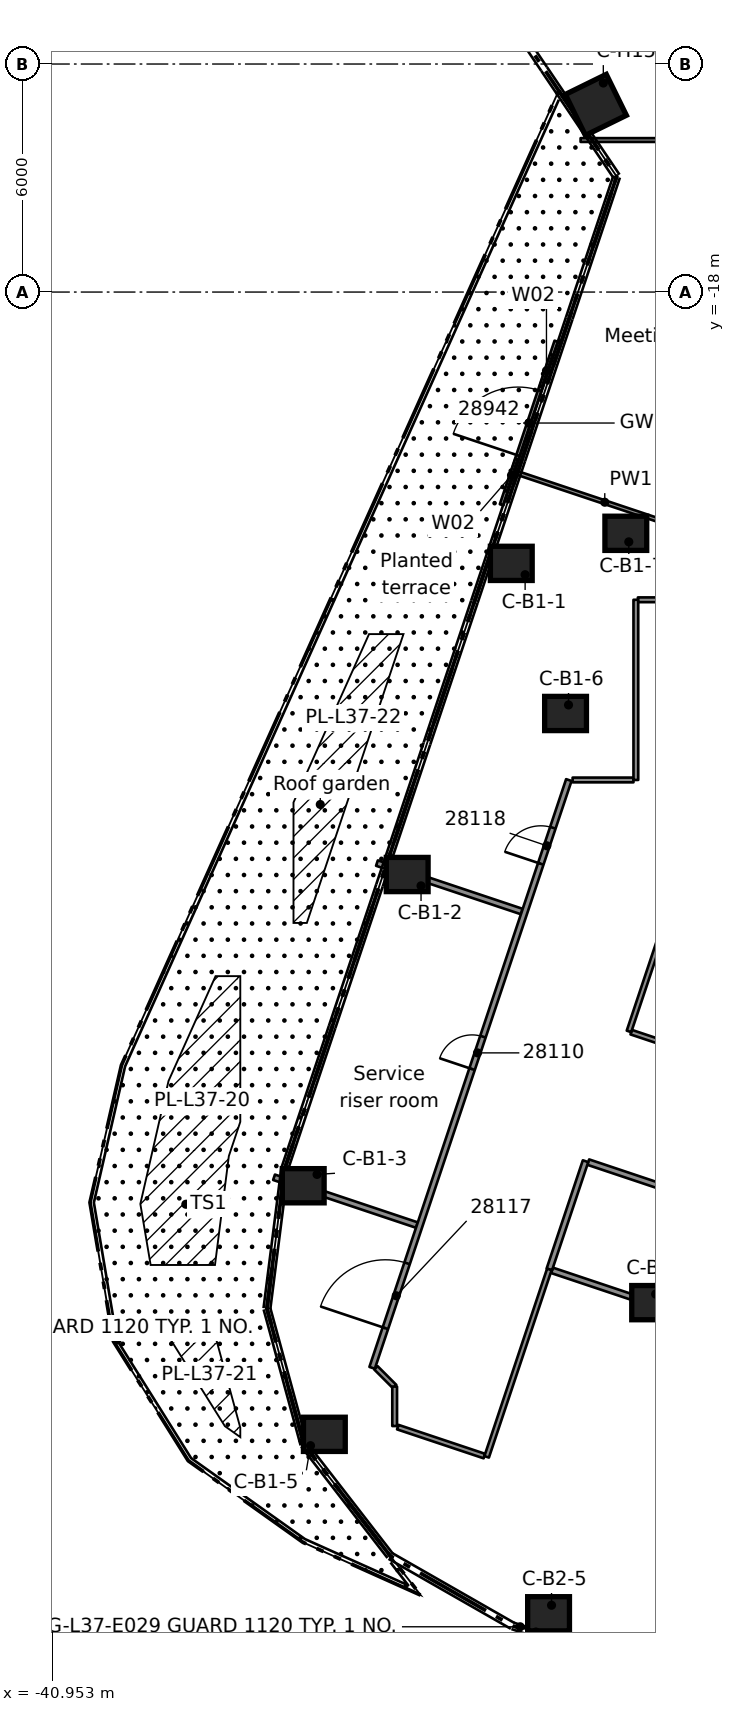
"""IFC4 building model, lengths in metres.
Left out: names, types, materials, properties, quantities, classifications, styles, units other than length and angle.
Written with IfcOpenShell. Run it as: python <this file> out.ifc"""

import sys

from ifc_helpers import new_model, si_unit, direction, frame, frame_2d, origin, origin_2d, place, context, subcontext, project, spatial, rectangle, extrude, element, fill, save


model = new_model("IFC4")
c1 = context("Model", 3, precision=1e-05, world=origin(), true_north=direction((0.0, 1.0)))
c2 = subcontext(c1, "Body", "Model", "MODEL_VIEW")
j1 = project(units=[si_unit("LENGTHUNIT", "METRE"), si_unit("PLANEANGLEUNIT", "RADIAN")], contexts=[c1])
p1 = place(None, origin())
s1 = spatial("IfcSite", under=j1, at=p1, CompositionType="ELEMENT")
p2 = place(p1, origin())
s2 = spatial("IfcBuilding", under=s1, at=p2, CompositionType="ELEMENT")
p3 = place(p2, frame((0.0, 0.0, 145.6)))
s3 = spatial("IfcBuildingStorey", under=s2, at=p3, CompositionType="ELEMENT", Elevation=145.6)
for number, where, z_axis, x_axis in (
    (1, (-28.869, -25.139, 0.0), (0.0, 0.0, 1.0), (1.0, 0.0, 0.0)),
    (2, (-31.608, -33.326, 0.0), (0.0, 0.0, 1.0), (1.0, 0.0, 0.0)),
    (3, (-34.344, -41.515, 0.0), (0.0, 0.0, 1.0), (1.0, 0.0, 0.0)),
    (4, (-33.788, -48.056, 0.0), (0.0, 0.0, 1.0), (1.0, 0.0, 0.0)),
    (5, (-27.441, -29.089, 0.0), (0.0, 0.0, 1.0), (1.0, 0.0, 0.0)),
    (6, (-25.855, -24.348, 0.0), (0.0, 0.0, 1.0), (1.0, 0.0, 0.0)),
    (7, (-25.149, -44.591, 0.0), (0.0, 0.0, 1.0), (1.0, 0.0, 0.0)),
    (8, (-27.888, -52.778, 0.0), (0.0, 0.0, 1.0), (1.0, 0.0, 0.0)),
):
    element("IfcColumn", number, at=place(p3, frame(where, z_axis=z_axis, x_axis=x_axis)), inside=s3, PredefinedType="COLUMN", context=c2, shape_type="SweptSolid", body=[
        extrude(rectangle(XDim=1.1, YDim=0.9, at=origin_2d()), origin(), (0.0, 0.0, 1.0), 3.5),
    ])
p4 = place(p3, frame((-26.644, -13.075, 0.0), z_axis=(0.0, 0.0, 1.0), x_axis=(-0.897727910651, -0.440550335873, 0.0)))
e9 = element("IfcColumn", 9, at=p4, inside=s3, PredefinedType="COLUMN", context=c2, shape_type="SweptSolid", body=[
    extrude(rectangle(XDim=1.2, YDim=1.2, at=origin_2d()), origin(), (0.0, 0.0, 1.0), 3.5),
])
p5 = place(p3, frame((-29.123, -23.598, 0.0), z_axis=(0.0, 0.0, 1.0), x_axis=(0.317308744881, 0.948322287211, 0.0)))
e10 = element("IfcWall", 10, at=p5, inside=s3, PredefinedType="STANDARD", context=c2, shape_type="SweptSolid", body=[
    extrude(rectangle(XDim=4.539, YDim=0.1, at=frame_2d((2.27, 0.0))), origin(), (0.0, 0.0, 1.0), 3.1),
])
p6 = place(p5, frame((1.369, 0.0, 0.0)))
e11 = element("IfcOpeningElement", 11, at=p6, cuts=e10, PredefinedType="OPENING", context=c2, shape_type="SweptSolid", body=[
    extrude(rectangle(XDim=1.8, YDim=2.4, at=frame_2d((0.9, 1.2))), frame((0.0, 0.06, 0.0), z_axis=(0.0, -1.0, 0.0), x_axis=(1.0, 0.0, 0.0)), (0.0, 0.0, 1.0), 0.12),
])
p7 = place(p5, frame((0.369, 0.0, 0.0)))
e12 = element("IfcOpeningElement", 12, at=p7, cuts=e10, PredefinedType="OPENING", context=c2, shape_type="SweptSolid", body=[
    extrude(rectangle(XDim=0.9, YDim=2.4, at=frame_2d((0.45, 1.2))), frame((0.0, 0.06, 0.0), z_axis=(0.0, -1.0, 0.0), x_axis=(1.0, 0.0, 0.0)), (0.0, 0.0, 1.0), 0.12),
])
p8 = place(p5, frame((3.269, 0.0, 0.0)))
e13 = element("IfcOpeningElement", 13, at=p8, cuts=e10, PredefinedType="OPENING", context=c2, shape_type="SweptSolid", body=[
    extrude(rectangle(XDim=0.9, YDim=2.4, at=frame_2d((0.45, 1.2))), frame((0.0, 0.06, 0.0), z_axis=(0.0, -1.0, 0.0), x_axis=(1.0, 0.0, 0.0)), (0.0, 0.0, 1.0), 0.12),
])
p9 = place(p3, frame((-31.856, -47.866, 0.0), z_axis=(0.0, 0.0, 1.0), x_axis=(0.948398445466, -0.317081044274, 0.0)))
e14 = element("IfcWall", 14, at=p9, inside=s3, PredefinedType="PARTITIONING", context=c2, shape_type="SweptSolid", body=[
    extrude(rectangle(XDim=2.403, YDim=0.125, at=frame_2d((1.202, 0.0))), origin(), (0.0, 0.0, 1.0), 3.08),
])
p10 = place(p3, frame((-35.112, -41.292, 0.0), z_axis=(0.0, 0.0, 1.0), x_axis=(0.948300748581, -0.317373108881, 0.0)))
e15 = element("IfcWall", 15, at=p10, inside=s3, PredefinedType="PARTITIONING", context=c2, shape_type="SweptSolid", body=[
    extrude(rectangle(XDim=3.964, YDim=0.15, at=frame_2d((1.982, 0.0))), origin(), (0.0, 0.0, 1.0), 3.08),
])
p11 = place(p3, frame((-27.797, -43.741, 0.0), z_axis=(0.0, 0.0, 1.0), x_axis=(0.948342550157, -0.31724817976, 0.0)))
e16 = element("IfcWall", 16, at=p11, inside=s3, PredefinedType="PARTITIONING", context=c2, shape_type="SweptSolid", body=[
    extrude(rectangle(XDim=24.041, YDim=0.15, at=frame_2d((12.021, 0.0))), origin(), (0.0, 0.0, 1.0), 3.08),
])
p12 = place(p3, frame((-4.12, -48.496, 0.0), z_axis=(0.0, 0.0, 1.0), x_axis=(-0.948327115108, 0.31729431566, 0.0)))
e17 = element("IfcWall", 17, at=p12, inside=s3, PredefinedType="PARTITIONING", context=c2, shape_type="SweptSolid", body=[
    extrude(rectangle(XDim=23.962, YDim=0.15, at=frame_2d((11.981, 0.0))), origin(), (0.0, 0.0, 1.0), 3.08),
])
p13 = place(p12, frame((11.525, 0.0, 0.0)))
e18 = element("IfcOpeningElement", 18, at=p13, cuts=e17, PredefinedType="OPENING", context=c2, shape_type="SweptSolid", body=[
    extrude(rectangle(XDim=0.9, YDim=2.1, at=frame_2d((0.45, 1.05))), frame((0.0, 0.085, 0.0), z_axis=(0.0, -1.0, 0.0), x_axis=(1.0, 0.0, 0.0)), (0.0, 0.0, 1.0), 0.17),
])
p14 = place(p3, frame((-25.713, -37.474, 0.0), z_axis=(0.0, 0.0, 1.0), x_axis=(0.948252483091, -0.317517288209, 0.0)))
e19 = element("IfcWall", 19, at=p14, inside=s3, PredefinedType="PARTITIONING", context=c2, shape_type="SweptSolid", body=[
    extrude(rectangle(XDim=1.533, YDim=0.125, at=frame_2d((0.767, 0.0))), origin(), (0.0, 0.0, 1.0), 3.08),
])
p15 = place(p3, frame((-32.404, -33.025, 0.0), z_axis=(0.0, 0.0, 1.0), x_axis=(0.948324257316, -0.317302856884, 0.0)))
e20 = element("IfcWall", 20, at=p15, inside=s3, PredefinedType="PARTITIONING", context=c2, shape_type="SweptSolid", body=[
    extrude(rectangle(XDim=4.019, YDim=0.15, at=frame_2d((2.009, 0.0))), origin(), (0.0, 0.0, 1.0), 3.08),
])
p16 = place(p3, frame((-28.735, -22.752, 0.0), z_axis=(0.0, 0.0, 1.0), x_axis=(0.948349317967, -0.317227948188, 0.0)))
e21 = element("IfcWall", 21, at=p16, inside=s3, PredefinedType="PARTITIONING", context=c2, shape_type="SweptSolid", body=[
    extrude(rectangle(XDim=4.906, YDim=0.1, at=frame_2d((2.453, 0.0))), origin(), (0.0, 0.0, 1.0), 3.08),
])
p17 = place(p3, frame((-32.431, -46.306, 0.0), z_axis=(0.0, 0.0, 1.0), x_axis=(0.706931689754, -0.707281829274, 0.0)))
e22 = element("IfcWall", 22, at=p17, inside=s3, PredefinedType="PARTITIONING", context=c2, shape_type="SweptSolid", body=[
    extrude(rectangle(XDim=0.697, YDim=0.125, at=frame_2d((0.349, 0.0))), origin(), (0.0, 0.0, 1.0), 3.08),
])
p18 = place(p3, frame((-27.255, -30.838, 0.0), z_axis=(0.0, 0.0, 1.0), x_axis=(1.0, 0.0, 0.0)))
e23 = element("IfcWall", 23, at=p18, inside=s3, PredefinedType="PARTITIONING", context=c2, shape_type="SweptSolid", body=[
    extrude(rectangle(XDim=1.601, YDim=0.125, at=frame_2d((0.8, 0.0))), origin(), (0.0, 0.0, 1.0), 3.08),
])
p19 = place(p3, frame((-25.538, -26.097, 0.0), z_axis=(0.0, 0.0, 1.0), x_axis=(1.0, 0.0, 0.0)))
e24 = element("IfcWall", 24, at=p19, inside=s3, PredefinedType="PARTITIONING", context=c2, shape_type="SweptSolid", body=[
    extrude(rectangle(XDim=1.471, YDim=0.125, at=frame_2d((0.736, 0.0))), origin(), (0.0, 0.0, 1.0), 3.08),
])
p20 = place(p3, frame((-27.045, -14.0, 0.0), z_axis=(0.0, 0.0, 1.0), x_axis=(1.0, 0.0, 0.0)))
e25 = element("IfcWall", 25, at=p20, inside=s3, PredefinedType="PARTITIONING", context=c2, shape_type="SweptSolid", body=[
    extrude(rectangle(XDim=5.533, YDim=0.1, at=frame_2d((2.767, 0.0))), origin(), (0.0, 0.0, 1.0), 3.08),
])
p21 = place(p3, frame((-27.868, -43.717, 0.0), z_axis=(0.0, 0.0, 1.0), x_axis=(0.317276218283, 0.948333169995, 0.0)))
e26 = element("IfcWall", 26, at=p21, inside=s3, PredefinedType="PARTITIONING", context=c2, shape_type="SweptSolid", body=[
    extrude(rectangle(XDim=3.003, YDim=0.15, at=frame_2d((1.502, 0.0))), origin(), (0.0, 0.0, 1.0), 3.08),
])
p22 = place(p3, frame((-21.805, -25.594, 0.0), z_axis=(0.0, 0.0, 1.0), x_axis=(-0.317211500161, -0.948354819762, 0.0)))
e27 = element("IfcWall", 27, at=p22, inside=s3, PredefinedType="PARTITIONING", context=c2, shape_type="SweptSolid", body=[
    extrude(rectangle(XDim=12.506, YDim=0.125, at=frame_2d((6.253, 0.0))), origin(), (0.0, 0.0, 1.0), 3.08),
])
p23 = place(p22, frame((2.098, 0.0, 0.0)))
e28 = element("IfcOpeningElement", 28, at=p23, cuts=e27, PredefinedType="OPENING", context=c2, shape_type="SweptSolid", body=[
    extrude(rectangle(XDim=0.9, YDim=2.1, at=frame_2d((0.45, 1.05))), frame((0.0, 0.073, 0.0), z_axis=(0.0, -1.0, 0.0), x_axis=(1.0, 0.0, 0.0)), (0.0, 0.0, 1.0), 0.145),
])
p24 = place(p3, frame((-29.517, -48.648, 0.0), z_axis=(0.0, 0.0, 1.0), x_axis=(0.317185500333, 0.948363515947, 0.0)))
e29 = element("IfcWall", 29, at=p24, inside=s3, PredefinedType="PARTITIONING", context=c2, shape_type="SweptSolid", body=[
    extrude(rectangle(XDim=5.199, YDim=0.125, at=frame_2d((2.6, 0.0))), origin(), (0.0, 0.0, 1.0), 3.08),
])
p25 = place(p3, frame((-32.531, -46.306, 0.0), z_axis=(0.0, 0.0, 1.0), x_axis=(0.317372718061, 0.948300879379, 0.0)))
e30 = element("IfcWall", 30, at=p25, inside=s3, PredefinedType="PARTITIONING", context=c2, shape_type="SweptSolid", body=[
    extrude(rectangle(XDim=16.309, YDim=0.15, at=frame_2d((8.155, 0.0))), origin(), (0.0, 0.0, 1.0), 3.08),
])
p26 = place(p25, frame((8.289, 0.0, 0.0)))
e31 = element("IfcOpeningElement", 31, at=p26, cuts=e30, PredefinedType="OPENING", context=c2, shape_type="SweptSolid", body=[
    extrude(rectangle(XDim=0.9, YDim=2.1, at=frame_2d((0.45, 1.05))), frame((0.0, 0.085, 0.0), z_axis=(0.0, -1.0, 0.0), x_axis=(1.0, 0.0, 0.0)), (0.0, 0.0, 1.0), 0.17),
])
p27 = place(p25, frame((1.1, 0.0, 0.0)))
e32 = element("IfcOpeningElement", 32, at=p27, cuts=e30, PredefinedType="OPENING", context=c2, shape_type="SweptSolid", body=[
    extrude(rectangle(XDim=1.8, YDim=2.1, at=frame_2d((0.9, 1.05))), frame((0.0, 0.085, 0.0), z_axis=(0.0, -1.0, 0.0), x_axis=(1.0, 0.0, 0.0)), (0.0, 0.0, 1.0), 0.17),
])
p28 = place(p25, frame((13.985, 0.0, 0.0)))
e33 = element("IfcOpeningElement", 33, at=p28, cuts=e30, PredefinedType="OPENING", context=c2, shape_type="SweptSolid", body=[
    extrude(rectangle(XDim=1.0, YDim=2.1, at=frame_2d((0.5, 1.05))), frame((0.0, 0.085, 0.0), z_axis=(0.0, -1.0, 0.0), x_axis=(1.0, 0.0, 0.0)), (0.0, 0.0, 1.0), 0.17),
])
p29 = place(p3, frame((-25.591, -30.838, 0.0), z_axis=(0.0, 0.0, 1.0), x_axis=(0.0, 1.0, 0.0)))
e34 = element("IfcWall", 34, at=p29, inside=s3, PredefinedType="PARTITIONING", context=c2, shape_type="SweptSolid", body=[
    extrude(rectangle(XDim=4.741, YDim=0.125, at=frame_2d((2.371, 0.0))), origin(), (0.0, 0.0, 1.0), 3.08),
])
p30 = place(p3, frame((-31.938, -47.838, 0.0), z_axis=(0.0, 0.0, 1.0), x_axis=(0.0, 1.0, 0.0)))
e35 = element("IfcWall", 35, at=p30, inside=s3, PredefinedType="PARTITIONING", context=c2, shape_type="SweptSolid", body=[
    extrude(rectangle(XDim=1.039, YDim=0.125, at=frame_2d((0.52, 0.0))), origin(), (0.0, 0.0, 1.0), 3.08),
])
p31 = place(p6, origin())
e36 = element("IfcDoor", 36, at=p31, inside=s3, OperationType="DOUBLE_DOOR_SINGLE_SWING", PredefinedType="DOOR", context=c2, shape_type="SweptSolid", body=[
    extrude(rectangle(XDim=1.8, YDim=2.4, at=frame_2d((0.9, 1.2))), frame((0.0, 0.025, 0.0), z_axis=(0.0, -1.0, 0.0), x_axis=(1.0, 0.0, 0.0)), (0.0, 0.0, 1.0), 0.05),
])
fill(e11, e36)
p32 = place(p7, origin())
e37 = element("IfcWindow", 37, at=p32, inside=s3, PartitioningType="SINGLE_PANEL", PredefinedType="WINDOW", context=c2, shape_type="SweptSolid", body=[
    extrude(rectangle(XDim=0.9, YDim=2.4, at=frame_2d((0.45, 1.2))), frame((0.0, 0.03, 0.0), z_axis=(0.0, -1.0, 0.0), x_axis=(1.0, 0.0, 0.0)), (0.0, 0.0, 1.0), 0.06),
])
fill(e12, e37)
p33 = place(p8, origin())
e38 = element("IfcWindow", 38, at=p33, inside=s3, PartitioningType="SINGLE_PANEL", PredefinedType="WINDOW", context=c2, shape_type="SweptSolid", body=[
    extrude(rectangle(XDim=0.9, YDim=2.4, at=frame_2d((0.45, 1.2))), frame((0.0, 0.03, 0.0), z_axis=(0.0, -1.0, 0.0), x_axis=(1.0, 0.0, 0.0)), (0.0, 0.0, 1.0), 0.06),
])
fill(e13, e38)
p34 = place(p26, origin())
e39 = element("IfcDoor", 39, at=p34, inside=s3, OperationType="SINGLE_SWING_RIGHT", PredefinedType="DOOR", context=c2, shape_type="SweptSolid", body=[
    extrude(rectangle(XDim=0.9, YDim=2.1, at=frame_2d((0.45, 1.05))), frame((0.0, 0.025, 0.0), z_axis=(0.0, -1.0, 0.0), x_axis=(1.0, 0.0, 0.0)), (0.0, 0.0, 1.0), 0.05),
])
fill(e31, e39)
p35 = place(p27, origin())
e40 = element("IfcDoor", 40, at=p35, inside=s3, OperationType="DOUBLE_DOOR_SINGLE_SWING", PredefinedType="DOOR", context=c2, shape_type="SweptSolid", body=[
    extrude(rectangle(XDim=1.8, YDim=2.1, at=frame_2d((0.9, 1.05))), frame((0.0, 0.025, 0.0), z_axis=(0.0, -1.0, 0.0), x_axis=(1.0, 0.0, 0.0)), (0.0, 0.0, 1.0), 0.05),
])
fill(e32, e40)
p36 = place(p28, origin())
e41 = element("IfcDoor", 41, at=p36, inside=s3, OperationType="SINGLE_SWING_RIGHT", PredefinedType="DOOR", context=c2, shape_type="SweptSolid", body=[
    extrude(rectangle(XDim=1.0, YDim=2.1, at=frame_2d((0.5, 1.05))), frame((0.0, 0.025, 0.0), z_axis=(0.0, -1.0, 0.0), x_axis=(1.0, 0.0, 0.0)), (0.0, 0.0, 1.0), 0.05),
])
fill(e33, e41)
save(model, sys.argv[1])
